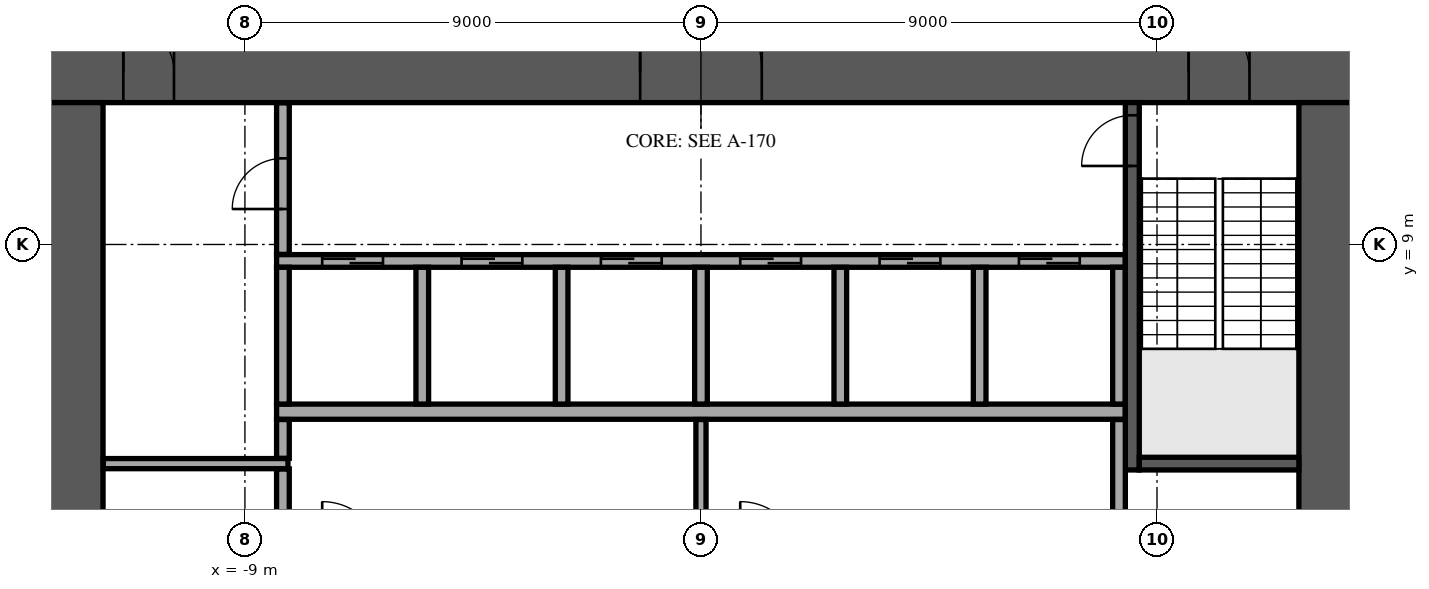
"""IFC4 building model, lengths in metres.
Left out: names, types, materials, properties, quantities, classifications, styles, units other than length and angle.
Written with IfcOpenShell. Run it as: python <this file> out.ifc"""

import sys

from ifc_helpers import new_model, si_unit, direction, frame, frame_2d, origin, place, context, subcontext, project, spatial, rectangle, extrude, element, fill, save


model = new_model("IFC4")
c1 = context("Model", 3, precision=1e-05, world=origin(), true_north=direction((0.0, 1.0)))
c2 = subcontext(c1, "Body", "Model", "MODEL_VIEW")
j1 = project(units=[si_unit("LENGTHUNIT", "METRE"), si_unit("PLANEANGLEUNIT", "RADIAN")], contexts=[c1])
p1 = place(None, origin())
s1 = spatial("IfcSite", under=j1, at=p1, CompositionType="ELEMENT")
p2 = place(p1, origin())
s2 = spatial("IfcBuilding", under=s1, at=p2, CompositionType="ELEMENT")
p3 = place(p2, frame((0.0, 0.0, 36.9)))
s3 = spatial("IfcBuildingStorey", under=s2, at=p3, CompositionType="ELEMENT", Elevation=36.9)
p4 = place(p3, frame((-13.0, 12.4, 0.0), z_axis=(0.0, 0.0, 1.0), x_axis=(1.0, 0.0, 0.0)))
e1 = element("IfcWall", 1, at=p4, inside=s3, PredefinedType="SHEAR", context=c2, shape_type="SweptSolid", body=[
    extrude(rectangle(XDim=26.0, YDim=1.2, at=frame_2d((13.0, 0.0))), origin(), (0.0, 0.0, 1.0), 4.35),
])
p5 = place(p4, frame((11.8, 0.0, 0.0)))
e2 = element("IfcOpeningElement", 2, at=p5, cuts=e1, PredefinedType="OPENING", context=c2, shape_type="SweptSolid", body=[
    extrude(rectangle(XDim=2.4, YDim=2.4, at=frame_2d((1.2, 1.2))), frame((0.0, 0.61, 0.0), z_axis=(0.0, -1.0, 0.0), x_axis=(1.0, 0.0, 0.0)), (0.0, 0.0, 1.0), 1.22),
])
p6 = place(p4, frame((22.625, 0.0, 0.0)))
e3 = element("IfcOpeningElement", 3, at=p6, cuts=e1, PredefinedType="OPENING", context=c2, shape_type="SweptSolid", body=[
    extrude(rectangle(XDim=1.2, YDim=2.1, at=frame_2d((0.6, 1.05))), frame((0.0, 0.61, 0.0), z_axis=(0.0, -1.0, 0.0), x_axis=(1.0, 0.0, 0.0)), (0.0, 0.0, 1.0), 1.22),
])
p7 = place(p4, frame((1.6, 0.0, 0.0)))
e4 = element("IfcOpeningElement", 4, at=p7, cuts=e1, PredefinedType="OPENING", context=c2, shape_type="SweptSolid", body=[
    extrude(rectangle(XDim=1.0, YDim=2.1, at=frame_2d((0.5, 1.05))), frame((0.0, 0.61, 0.0), z_axis=(0.0, -1.0, 0.0), x_axis=(1.0, 0.0, 0.0)), (0.0, 0.0, 1.0), 1.22),
])
p8 = place(p3, frame((12.4, -11.8, 0.0), z_axis=(0.0, 0.0, 1.0), x_axis=(0.0, 1.0, 0.0)))
e5 = element("IfcWall", 5, at=p8, inside=s3, PredefinedType="SHEAR", context=c2, shape_type="SweptSolid", body=[
    extrude(rectangle(XDim=23.6, YDim=1.2, at=frame_2d((11.8, 0.0))), origin(), (0.0, 0.0, 1.0), 4.35),
])
p9 = place(p8, frame((10.6, 0.0, 0.0)))
e6 = element("IfcOpeningElement", 6, at=p9, cuts=e5, PredefinedType="OPENING", context=c2, shape_type="SweptSolid", body=[
    extrude(rectangle(XDim=2.4, YDim=2.4, at=frame_2d((1.2, 1.2))), frame((0.0, 0.61, 0.0), z_axis=(0.0, -1.0, 0.0), x_axis=(1.0, 0.0, 0.0)), (0.0, 0.0, 1.0), 1.22),
])
p10 = place(p3, frame((-12.4, -11.8, 0.0), z_axis=(0.0, 0.0, 1.0), x_axis=(0.0, 1.0, 0.0)))
e7 = element("IfcWall", 7, at=p10, inside=s3, PredefinedType="SHEAR", context=c2, shape_type="SweptSolid", body=[
    extrude(rectangle(XDim=23.6, YDim=1.2, at=frame_2d((11.8, 0.0))), origin(), (0.0, 0.0, 1.0), 4.35),
])
p11 = place(p10, frame((10.6, 0.0, 0.0)))
e8 = element("IfcOpeningElement", 8, at=p11, cuts=e7, PredefinedType="OPENING", context=c2, shape_type="SweptSolid", body=[
    extrude(rectangle(XDim=2.4, YDim=2.4, at=frame_2d((1.2, 1.2))), frame((0.0, 0.61, 0.0), z_axis=(0.0, -1.0, 0.0), x_axis=(1.0, 0.0, 0.0)), (0.0, 0.0, 1.0), 1.22),
])
p12 = place(p3, frame((-8.375, 5.7, 0.0), z_axis=(0.0, 0.0, 1.0), x_axis=(1.0, 0.0, 0.0)))
e9 = element("IfcWall", 9, at=p12, inside=s3, PredefinedType="SOLIDWALL", context=c2, shape_type="SweptSolid", body=[
    extrude(rectangle(XDim=16.75, YDim=0.3, at=frame_2d((8.375, 0.0))), origin(), (0.0, 0.0, 1.0), 4.35),
])
p13 = place(p3, frame((-8.375, 8.675, 0.0), z_axis=(0.0, 0.0, 1.0), x_axis=(1.0, 0.0, 0.0)))
e10 = element("IfcWall", 10, at=p13, inside=s3, PredefinedType="SOLIDWALL", context=c2, shape_type="SweptSolid", body=[
    extrude(rectangle(XDim=16.75, YDim=0.25, at=frame_2d((8.375, 0.0))), origin(), (0.0, 0.0, 1.0), 4.35),
])
p14 = place(p13, frame((0.9, 0.0, 0.0)))
e11 = element("IfcOpeningElement", 11, at=p14, cuts=e10, PredefinedType="OPENING", context=c2, shape_type="SweptSolid", body=[
    extrude(rectangle(XDim=1.2, YDim=2.1, at=frame_2d((0.6, 1.05))), frame((0.0, 0.135, 0.0), z_axis=(0.0, -1.0, 0.0), x_axis=(1.0, 0.0, 0.0)), (0.0, 0.0, 1.0), 0.27),
])
p15 = place(p13, frame((3.65, 0.0, 0.0)))
e12 = element("IfcOpeningElement", 12, at=p15, cuts=e10, PredefinedType="OPENING", context=c2, shape_type="SweptSolid", body=[
    extrude(rectangle(XDim=1.2, YDim=2.1, at=frame_2d((0.6, 1.05))), frame((0.0, 0.135, 0.0), z_axis=(0.0, -1.0, 0.0), x_axis=(1.0, 0.0, 0.0)), (0.0, 0.0, 1.0), 0.27),
])
p16 = place(p13, frame((6.4, 0.0, 0.0)))
e13 = element("IfcOpeningElement", 13, at=p16, cuts=e10, PredefinedType="OPENING", context=c2, shape_type="SweptSolid", body=[
    extrude(rectangle(XDim=1.2, YDim=2.1, at=frame_2d((0.6, 1.05))), frame((0.0, 0.135, 0.0), z_axis=(0.0, -1.0, 0.0), x_axis=(1.0, 0.0, 0.0)), (0.0, 0.0, 1.0), 0.27),
])
p17 = place(p13, frame((9.15, 0.0, 0.0)))
e14 = element("IfcOpeningElement", 14, at=p17, cuts=e10, PredefinedType="OPENING", context=c2, shape_type="SweptSolid", body=[
    extrude(rectangle(XDim=1.2, YDim=2.1, at=frame_2d((0.6, 1.05))), frame((0.0, 0.135, 0.0), z_axis=(0.0, -1.0, 0.0), x_axis=(1.0, 0.0, 0.0)), (0.0, 0.0, 1.0), 0.27),
])
p18 = place(p13, frame((11.9, 0.0, 0.0)))
e15 = element("IfcOpeningElement", 15, at=p18, cuts=e10, PredefinedType="OPENING", context=c2, shape_type="SweptSolid", body=[
    extrude(rectangle(XDim=1.2, YDim=2.1, at=frame_2d((0.6, 1.05))), frame((0.0, 0.135, 0.0), z_axis=(0.0, -1.0, 0.0), x_axis=(1.0, 0.0, 0.0)), (0.0, 0.0, 1.0), 0.27),
])
p19 = place(p13, frame((14.65, 0.0, 0.0)))
e16 = element("IfcOpeningElement", 16, at=p19, cuts=e10, PredefinedType="OPENING", context=c2, shape_type="SweptSolid", body=[
    extrude(rectangle(XDim=1.2, YDim=2.1, at=frame_2d((0.6, 1.05))), frame((0.0, 0.135, 0.0), z_axis=(0.0, -1.0, 0.0), x_axis=(1.0, 0.0, 0.0)), (0.0, 0.0, 1.0), 0.27),
])
for number, where, z_axis, x_axis in (
    (17, (-8.25, 5.85, 0.0), (0.0, 0.0, 1.0), (0.0, 1.0, 0.0)),
    (18, (-5.5, 5.85, 0.0), (0.0, 0.0, 1.0), (0.0, 1.0, 0.0)),
    (19, (-2.75, 5.85, 0.0), (0.0, 0.0, 1.0), (0.0, 1.0, 0.0)),
    (20, (0.0, 5.85, 0.0), (0.0, 0.0, 1.0), (0.0, 1.0, 0.0)),
    (21, (2.75, 5.85, 0.0), (0.0, 0.0, 1.0), (0.0, 1.0, 0.0)),
    (22, (5.5, 5.85, 0.0), (0.0, 0.0, 1.0), (0.0, 1.0, 0.0)),
    (23, (8.25, 5.85, 0.0), (0.0, 0.0, 1.0), (0.0, 1.0, 0.0)),
):
    element("IfcWall", number, at=place(p3, frame(where, z_axis=z_axis, x_axis=x_axis)), inside=s3, PredefinedType="SOLIDWALL", context=c2, shape_type="SweptSolid", body=[
        extrude(rectangle(XDim=2.7, YDim=0.25, at=frame_2d((1.35, 0.0))), origin(), (0.0, 0.0, 1.0), 4.35),
    ])
p20 = place(p3, frame((8.512, 4.55, 0.0), z_axis=(0.0, 0.0, 1.0), x_axis=(0.0, 1.0, 0.0)))
e24 = element("IfcWall", 24, at=p20, inside=s3, PredefinedType="SOLIDWALL", context=c2, shape_type="SweptSolid", body=[
    extrude(rectangle(XDim=7.25, YDim=0.275, at=frame_2d((3.625, 0.0))), origin(), (0.0, 0.0, 1.0), 4.35),
])
p21 = place(p20, frame((6.0, 0.0, 0.0)))
e25 = element("IfcOpeningElement", 25, at=p21, cuts=e24, PredefinedType="OPENING", context=c2, shape_type="SweptSolid", body=[
    extrude(rectangle(XDim=1.0, YDim=2.1, at=frame_2d((0.5, 1.05))), frame((0.0, 0.147, 0.0), z_axis=(0.0, -1.0, 0.0), x_axis=(1.0, 0.0, 0.0)), (0.0, 0.0, 1.0), 0.295),
])
p22 = place(p3, frame((8.65, 4.675, 0.0), z_axis=(0.0, 0.0, 1.0), x_axis=(1.0, 0.0, 0.0)))
e26 = element("IfcWall", 26, at=p22, inside=s3, PredefinedType="SOLIDWALL", context=c2, shape_type="SweptSolid", body=[
    extrude(rectangle(XDim=3.15, YDim=0.25, at=frame_2d((1.575, 0.0))), origin(), (0.0, 0.0, 1.0), 4.35),
])
p23 = place(p3, frame((-8.25, 2.855, 0.0), z_axis=(0.0, 0.0, 1.0), x_axis=(0.0, 1.0, 0.0)))
e27 = element("IfcWall", 27, at=p23, inside=s3, PredefinedType="PARTITIONING", context=c2, shape_type="SweptSolid", body=[
    extrude(rectangle(XDim=1.715, YDim=0.25, at=frame_2d((0.857, 0.0))), origin(), (0.0, 0.0, 1.0), 4.35),
])
p24 = place(p3, frame((0.0, 2.855, 0.0), z_axis=(0.0, 0.0, 1.0), x_axis=(0.0, 1.0, 0.0)))
e28 = element("IfcWall", 28, at=p24, inside=s3, PredefinedType="PARTITIONING", context=c2, shape_type="SweptSolid", body=[
    extrude(rectangle(XDim=2.69, YDim=0.2, at=frame_2d((1.345, 0.0))), origin(), (0.0, 0.0, 1.0), 4.35),
])
p25 = place(p3, frame((8.25, 2.855, 0.0), z_axis=(0.0, 0.0, 1.0), x_axis=(0.0, 1.0, 0.0)))
e29 = element("IfcWall", 29, at=p25, inside=s3, PredefinedType="PARTITIONING", context=c2, shape_type="SweptSolid", body=[
    extrude(rectangle(XDim=2.69, YDim=0.25, at=frame_2d((1.345, 0.0))), origin(), (0.0, 0.0, 1.0), 4.35),
])
p26 = place(p3, frame((-11.795, 4.675, 0.0), z_axis=(0.0, 0.0, 1.0), x_axis=(1.0, 0.0, 0.0)))
e30 = element("IfcWall", 30, at=p26, inside=s3, PredefinedType="PARTITIONING", context=c2, shape_type="SweptSolid", body=[
    extrude(rectangle(XDim=3.645, YDim=0.2, at=frame_2d((1.823, 0.0))), origin(), (0.0, 0.0, 1.0), 4.35),
])
p27 = place(p3, frame((-8.25, 4.78, 0.0), z_axis=(0.0, 0.0, 1.0), x_axis=(0.0, 1.0, 0.0)))
e31 = element("IfcWall", 31, at=p27, inside=s3, PredefinedType="PARTITIONING", context=c2, shape_type="SweptSolid", body=[
    extrude(rectangle(XDim=0.765, YDim=0.25, at=frame_2d((0.382, 0.0))), origin(), (0.0, 0.0, 1.0), 4.35),
])
p28 = place(p3, frame((-8.25, 8.805, 0.0), z_axis=(0.0, 0.0, 1.0), x_axis=(0.0, 1.0, 0.0)))
e32 = element("IfcWall", 32, at=p28, inside=s3, PredefinedType="PARTITIONING", context=c2, shape_type="SweptSolid", body=[
    extrude(rectangle(XDim=2.99, YDim=0.25, at=frame_2d((1.495, 0.0))), origin(), (0.0, 0.0, 1.0), 4.35),
])
p29 = place(p28, frame((0.895, 0.0, 0.0)))
e33 = element("IfcOpeningElement", 33, at=p29, cuts=e32, PredefinedType="OPENING", context=c2, shape_type="SweptSolid", body=[
    extrude(rectangle(XDim=1.0, YDim=2.1, at=frame_2d((0.5, 1.05))), frame((0.0, 0.135, 0.0), z_axis=(0.0, -1.0, 0.0), x_axis=(1.0, 0.0, 0.0)), (0.0, 0.0, 1.0), 0.27),
])
p30 = place(p5, origin())
e34 = element("IfcDoor", 34, at=p30, inside=s3, OperationType="SINGLE_SWING_LEFT", PredefinedType="DOOR", context=c2, shape_type="SweptSolid", body=[
    extrude(rectangle(XDim=2.4, YDim=2.4, at=frame_2d((1.2, 1.2))), frame((0.0, 0.025, 0.0), z_axis=(0.0, -1.0, 0.0), x_axis=(1.0, 0.0, 0.0)), (0.0, 0.0, 1.0), 0.05),
])
fill(e2, e34)
p31 = place(p6, origin())
e35 = element("IfcDoor", 35, at=p31, inside=s3, OperationType="SINGLE_SWING_LEFT", PredefinedType="DOOR", context=c2, shape_type="SweptSolid", body=[
    extrude(rectangle(XDim=1.2, YDim=2.1, at=frame_2d((0.6, 1.05))), frame((0.0, 0.025, 0.0), z_axis=(0.0, -1.0, 0.0), x_axis=(1.0, 0.0, 0.0)), (0.0, 0.0, 1.0), 0.05),
])
fill(e3, e35)
p32 = place(p7, origin())
e36 = element("IfcDoor", 36, at=p32, inside=s3, OperationType="SINGLE_SWING_LEFT", PredefinedType="DOOR", context=c2, shape_type="SweptSolid", body=[
    extrude(rectangle(XDim=1.0, YDim=2.1, at=frame_2d((0.5, 1.05))), frame((0.0, 0.025, 0.0), z_axis=(0.0, -1.0, 0.0), x_axis=(1.0, 0.0, 0.0)), (0.0, 0.0, 1.0), 0.05),
])
fill(e4, e36)
p33 = place(p14, origin())
e37 = element("IfcDoor", 37, at=p33, inside=s3, OperationType="DOUBLE_DOOR_SLIDING", PredefinedType="DOOR", context=c2, shape_type="SweptSolid", body=[
    extrude(rectangle(XDim=1.2, YDim=2.1, at=frame_2d((0.6, 1.05))), frame((0.0, 0.025, 0.0), z_axis=(0.0, -1.0, 0.0), x_axis=(1.0, 0.0, 0.0)), (0.0, 0.0, 1.0), 0.05),
])
fill(e11, e37)
p34 = place(p15, origin())
e38 = element("IfcDoor", 38, at=p34, inside=s3, OperationType="DOUBLE_DOOR_SLIDING", PredefinedType="DOOR", context=c2, shape_type="SweptSolid", body=[
    extrude(rectangle(XDim=1.2, YDim=2.1, at=frame_2d((0.6, 1.05))), frame((0.0, 0.025, 0.0), z_axis=(0.0, -1.0, 0.0), x_axis=(1.0, 0.0, 0.0)), (0.0, 0.0, 1.0), 0.05),
])
fill(e12, e38)
p35 = place(p16, origin())
e39 = element("IfcDoor", 39, at=p35, inside=s3, OperationType="DOUBLE_DOOR_SLIDING", PredefinedType="DOOR", context=c2, shape_type="SweptSolid", body=[
    extrude(rectangle(XDim=1.2, YDim=2.1, at=frame_2d((0.6, 1.05))), frame((0.0, 0.025, 0.0), z_axis=(0.0, -1.0, 0.0), x_axis=(1.0, 0.0, 0.0)), (0.0, 0.0, 1.0), 0.05),
])
fill(e13, e39)
p36 = place(p17, origin())
e40 = element("IfcDoor", 40, at=p36, inside=s3, OperationType="DOUBLE_DOOR_SLIDING", PredefinedType="DOOR", context=c2, shape_type="SweptSolid", body=[
    extrude(rectangle(XDim=1.2, YDim=2.1, at=frame_2d((0.6, 1.05))), frame((0.0, 0.025, 0.0), z_axis=(0.0, -1.0, 0.0), x_axis=(1.0, 0.0, 0.0)), (0.0, 0.0, 1.0), 0.05),
])
fill(e14, e40)
p37 = place(p18, origin())
e41 = element("IfcDoor", 41, at=p37, inside=s3, OperationType="DOUBLE_DOOR_SLIDING", PredefinedType="DOOR", context=c2, shape_type="SweptSolid", body=[
    extrude(rectangle(XDim=1.2, YDim=2.1, at=frame_2d((0.6, 1.05))), frame((0.0, 0.025, 0.0), z_axis=(0.0, -1.0, 0.0), x_axis=(1.0, 0.0, 0.0)), (0.0, 0.0, 1.0), 0.05),
])
fill(e15, e41)
p38 = place(p19, origin())
e42 = element("IfcDoor", 42, at=p38, inside=s3, OperationType="DOUBLE_DOOR_SLIDING", PredefinedType="DOOR", context=c2, shape_type="SweptSolid", body=[
    extrude(rectangle(XDim=1.2, YDim=2.1, at=frame_2d((0.6, 1.05))), frame((0.0, 0.025, 0.0), z_axis=(0.0, -1.0, 0.0), x_axis=(1.0, 0.0, 0.0)), (0.0, 0.0, 1.0), 0.05),
])
fill(e16, e42)
p39 = place(p21, origin())
e43 = element("IfcDoor", 43, at=p39, inside=s3, OperationType="SINGLE_SWING_LEFT", PredefinedType="DOOR", context=c2, shape_type="SweptSolid", body=[
    extrude(rectangle(XDim=1.0, YDim=2.1, at=frame_2d((0.5, 1.05))), frame((0.0, 0.025, 0.0), z_axis=(0.0, -1.0, 0.0), x_axis=(1.0, 0.0, 0.0)), (0.0, 0.0, 1.0), 0.05),
])
fill(e25, e43)
p40 = place(p29, origin())
e44 = element("IfcDoor", 44, at=p40, inside=s3, OperationType="SINGLE_SWING_LEFT", PredefinedType="DOOR", context=c2, shape_type="SweptSolid", body=[
    extrude(rectangle(XDim=1.0, YDim=2.1, at=frame_2d((0.5, 1.05))), frame((0.0, 0.025, 0.0), z_axis=(0.0, -1.0, 0.0), x_axis=(1.0, 0.0, 0.0)), (0.0, 0.0, 1.0), 0.05),
])
fill(e33, e44)
save(model, sys.argv[1])
